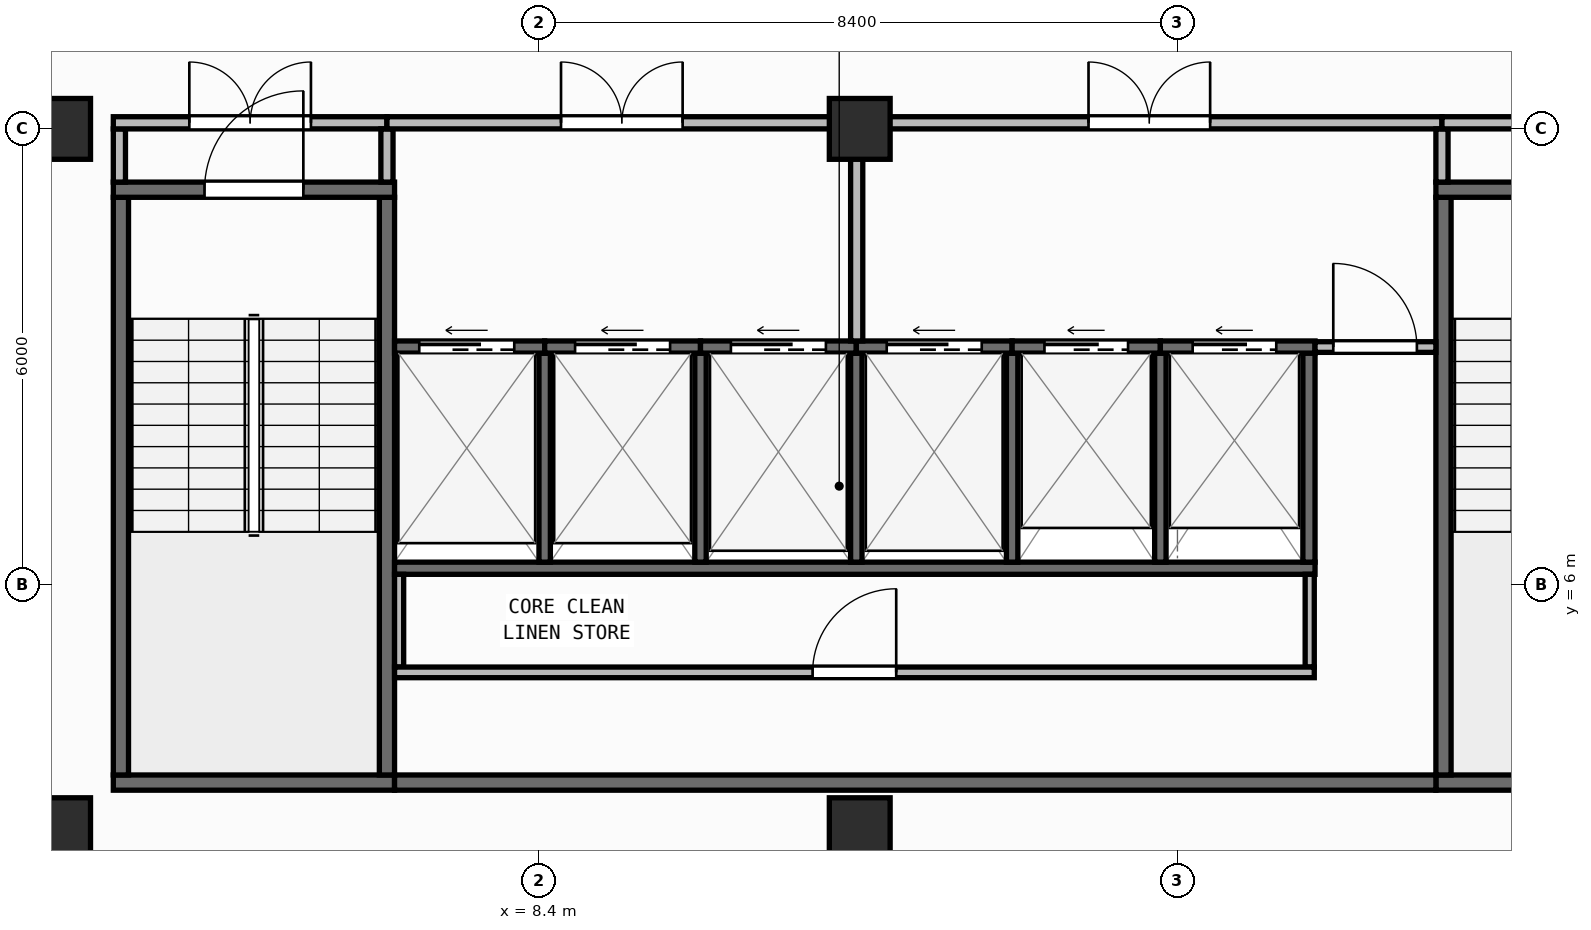
"""IFC4 building model, lengths in metres.
Left out: names, types, materials, properties, quantities, classifications, styles, units other than length and angle.
Written with IfcOpenShell. Run it as: python <this file> out.ifc"""

import sys

from ifc_helpers import new_model, si_unit, direction, frame, frame_2d, origin, origin_2d, place, context, subcontext, project, spatial, rectangle, extrude, element, fill, save


model = new_model("IFC4")
c1 = context("Model", 3, precision=1e-05, world=origin(), true_north=direction((0.0, 1.0)))
c2 = subcontext(c1, "Body", "Model", "MODEL_VIEW")
j1 = project(units=[si_unit("LENGTHUNIT", "METRE"), si_unit("PLANEANGLEUNIT", "RADIAN")], contexts=[c1])
p1 = place(None, origin())
s1 = spatial("IfcSite", under=j1, at=p1, CompositionType="ELEMENT")
p2 = place(p1, origin())
s2 = spatial("IfcBuilding", under=s1, at=p2, CompositionType="ELEMENT")
p3 = place(p2, frame((0.0, 0.0, 288.15)))
s3 = spatial("IfcBuildingStorey", under=s2, at=p3, CompositionType="ELEMENT", Elevation=288.15)
for number, where, z_axis, x_axis in (
    (1, (2.1, 2.8, 0.0), (0.0, 0.0, 1.0), (1.0, 0.0, 0.0)),
    (2, (12.62, 2.8, 0.0), (0.0, 0.0, 1.0), (1.0, 0.0, 0.0)),
    (3, (2.1, 12.0, 0.0), (0.0, 0.0, 1.0), (1.0, 0.0, 0.0)),
    (4, (12.62, 12.0, 0.0), (0.0, 0.0, 1.0), (1.0, 0.0, 0.0)),
):
    element("IfcColumn", number, at=place(p3, frame(where, z_axis=z_axis, x_axis=x_axis)), inside=s3, PredefinedType="COLUMN", context=c2, shape_type="SweptSolid", body=[
        extrude(rectangle(XDim=0.8, YDim=0.8, at=origin_2d()), origin(), (0.0, 0.0, 1.0), 3.95),
    ])
p4 = place(p3, frame((2.46, 0.171, 0.0), z_axis=(0.0, 0.0, 1.0), x_axis=(0.997760665813, 0.066885377746, 0.0)))
e5 = element("IfcWall", 5, at=p4, inside=s3, PredefinedType="STANDARD", context=c2, shape_type="SweptSolid", body=[
    extrude(rectangle(XDim=35.56, YDim=0.26, at=frame_2d((17.78, 0.0))), origin(), (0.0, 0.0, 1.0), 3.71),
])
p5 = place(p4, frame((16.58, 0.0, 0.9)))
e6 = element("IfcOpeningElement", 6, at=p5, cuts=e5, PredefinedType="OPENING", context=c2, shape_type="SweptSolid", body=[
    extrude(rectangle(XDim=2.4, YDim=1.65, at=frame_2d((1.2, 0.825))), frame((0.0, 0.14, 0.0), z_axis=(0.0, -1.0, 0.0), x_axis=(1.0, 0.0, 0.0)), (0.0, 0.0, 1.0), 0.28),
])
p6 = place(p3, frame((2.8, 3.4, 0.0), z_axis=(0.0, 0.0, 1.0), x_axis=(1.0, 0.0, 0.0)))
e7 = element("IfcWall", 7, at=p6, inside=s3, PredefinedType="SHEAR", context=c2, shape_type="SweptSolid", body=[
    extrude(rectangle(XDim=3.7, YDim=0.2, at=frame_2d((1.85, 0.0))), origin(), (0.0, 0.0, 1.0), 3.71),
])
for number, where, z_axis, x_axis in (
    (8, (2.9, 3.5, 0.0), (0.0, 0.0, 1.0), (0.0, 1.0, 0.0)),
    (9, (6.4, 3.5, 0.0), (0.0, 0.0, 1.0), (0.0, 1.0, 0.0)),
):
    element("IfcWall", number, at=place(p3, frame(where, z_axis=z_axis, x_axis=x_axis)), inside=s3, PredefinedType="SHEAR", context=c2, shape_type="SweptSolid", body=[
        extrude(rectangle(XDim=7.6, YDim=0.2, at=frame_2d((3.8, 0.0))), origin(), (0.0, 0.0, 1.0), 3.71),
    ])
p7 = place(p3, frame((2.8, 11.2, 0.0), z_axis=(0.0, 0.0, 1.0), x_axis=(1.0, 0.0, 0.0)))
e10 = element("IfcWall", 10, at=p7, inside=s3, PredefinedType="SHEAR", context=c2, shape_type="SweptSolid", body=[
    extrude(rectangle(XDim=3.7, YDim=0.2, at=frame_2d((1.85, 0.0))), origin(), (0.0, 0.0, 1.0), 3.71),
])
p8 = place(p7, frame((1.2, 0.0, 0.0)))
e11 = element("IfcOpeningElement", 11, at=p8, cuts=e10, PredefinedType="OPENING", context=c2, shape_type="SweptSolid", body=[
    extrude(rectangle(XDim=1.3, YDim=2.15, at=frame_2d((0.65, 1.075))), frame((0.0, 0.11, 0.0), z_axis=(0.0, -1.0, 0.0), x_axis=(1.0, 0.0, 0.0)), (0.0, 0.0, 1.0), 0.22),
])
p9 = place(p3, frame((20.2, 3.4, 0.0), z_axis=(0.0, 0.0, 1.0), x_axis=(1.0, 0.0, 0.0)))
e12 = element("IfcWall", 12, at=p9, inside=s3, PredefinedType="SHEAR", context=c2, shape_type="SweptSolid", body=[
    extrude(rectangle(XDim=3.7, YDim=0.2, at=frame_2d((1.85, 0.0))), origin(), (0.0, 0.0, 1.0), 3.71),
])
p10 = place(p3, frame((20.3, 3.5, 0.0), z_axis=(0.0, 0.0, 1.0), x_axis=(0.0, 1.0, 0.0)))
e13 = element("IfcWall", 13, at=p10, inside=s3, PredefinedType="SHEAR", context=c2, shape_type="SweptSolid", body=[
    extrude(rectangle(XDim=7.6, YDim=0.2, at=frame_2d((3.8, 0.0))), origin(), (0.0, 0.0, 1.0), 3.71),
])
p11 = place(p3, frame((20.2, 11.2, 0.0), z_axis=(0.0, 0.0, 1.0), x_axis=(1.0, 0.0, 0.0)))
e14 = element("IfcWall", 14, at=p11, inside=s3, PredefinedType="SHEAR", context=c2, shape_type="SweptSolid", body=[
    extrude(rectangle(XDim=3.7, YDim=0.2, at=frame_2d((1.85, 0.0))), origin(), (0.0, 0.0, 1.0), 3.71),
])
p12 = place(p11, frame((1.2, 0.0, 0.0)))
e15 = element("IfcOpeningElement", 15, at=p12, cuts=e14, PredefinedType="OPENING", context=c2, shape_type="SweptSolid", body=[
    extrude(rectangle(XDim=1.3, YDim=2.15, at=frame_2d((0.65, 1.075))), frame((0.0, 0.11, 0.0), z_axis=(0.0, -1.0, 0.0), x_axis=(1.0, 0.0, 0.0)), (0.0, 0.0, 1.0), 0.22),
])
p13 = place(p3, frame((6.5, 3.4, 0.0), z_axis=(0.0, 0.0, 1.0), x_axis=(1.0, 0.0, 0.0)))
e16 = element("IfcWall", 16, at=p13, inside=s3, PredefinedType="SHEAR", context=c2, shape_type="SweptSolid", body=[
    extrude(rectangle(XDim=13.7, YDim=0.2, at=frame_2d((6.85, 0.0))), origin(), (0.0, 0.0, 1.0), 3.71),
])
p14 = place(p3, frame((6.5, 6.22, 0.0), z_axis=(0.0, 0.0, 1.0), x_axis=(1.0, 0.0, 0.0)))
e17 = element("IfcWall", 17, at=p14, inside=s3, PredefinedType="SHEAR", context=c2, shape_type="SweptSolid", body=[
    extrude(rectangle(XDim=12.11, YDim=0.16, at=frame_2d((6.055, 0.0))), origin(), (0.0, 0.0, 1.0), 3.71),
])
p15 = place(p3, frame((18.53, 6.3, 0.0), z_axis=(0.0, 0.0, 1.0), x_axis=(0.0, 1.0, 0.0)))
e18 = element("IfcWall", 18, at=p15, inside=s3, PredefinedType="SHEAR", context=c2, shape_type="SweptSolid", body=[
    extrude(rectangle(XDim=2.75, YDim=0.16, at=frame_2d((1.375, 0.0))), origin(), (0.0, 0.0, 1.0), 3.71),
])
for number, where, z_axis, x_axis in (
    (19, (8.475, 6.3, 0.0), (0.0, 0.0, 1.0), (0.0, 1.0, 0.0)),
    (20, (10.525, 6.3, 0.0), (0.0, 0.0, 1.0), (0.0, 1.0, 0.0)),
    (21, (12.575, 6.3, 0.0), (0.0, 0.0, 1.0), (0.0, 1.0, 0.0)),
    (22, (14.625, 6.3, 0.0), (0.0, 0.0, 1.0), (0.0, 1.0, 0.0)),
    (23, (16.575, 6.3, 0.0), (0.0, 0.0, 1.0), (0.0, 1.0, 0.0)),
):
    element("IfcWall", number, at=place(p3, frame(where, z_axis=z_axis, x_axis=x_axis)), inside=s3, PredefinedType="SHEAR", context=c2, shape_type="SweptSolid", body=[
        extrude(rectangle(XDim=2.75, YDim=0.15, at=frame_2d((1.375, 0.0))), origin(), (0.0, 0.0, 1.0), 3.71),
    ])
p16 = place(p3, frame((6.5, 9.13, 0.0), z_axis=(0.0, 0.0, 1.0), x_axis=(1.0, 0.0, 0.0)))
e24 = element("IfcWall", 24, at=p16, inside=s3, PredefinedType="SHEAR", context=c2, shape_type="SweptSolid", body=[
    extrude(rectangle(XDim=1.975, YDim=0.16, at=frame_2d((0.988, 0.0))), origin(), (0.0, 0.0, 1.0), 3.71),
])
p17 = place(p16, frame((0.325, 0.0, 0.0)))
e25 = element("IfcOpeningElement", 25, at=p17, cuts=e24, PredefinedType="OPENING", context=c2, shape_type="SweptSolid", body=[
    extrude(rectangle(XDim=1.25, YDim=2.15, at=frame_2d((0.625, 1.075))), frame((0.0, 0.09, 0.0), z_axis=(0.0, -1.0, 0.0), x_axis=(1.0, 0.0, 0.0)), (0.0, 0.0, 1.0), 0.18),
])
p18 = place(p3, frame((8.475, 9.13, 0.0), z_axis=(0.0, 0.0, 1.0), x_axis=(1.0, 0.0, 0.0)))
e26 = element("IfcWall", 26, at=p18, inside=s3, PredefinedType="SHEAR", context=c2, shape_type="SweptSolid", body=[
    extrude(rectangle(XDim=2.05, YDim=0.16, at=frame_2d((1.025, 0.0))), origin(), (0.0, 0.0, 1.0), 3.71),
])
p19 = place(p18, frame((0.4, 0.0, 0.0)))
e27 = element("IfcOpeningElement", 27, at=p19, cuts=e26, PredefinedType="OPENING", context=c2, shape_type="SweptSolid", body=[
    extrude(rectangle(XDim=1.25, YDim=2.15, at=frame_2d((0.625, 1.075))), frame((0.0, 0.09, 0.0), z_axis=(0.0, -1.0, 0.0), x_axis=(1.0, 0.0, 0.0)), (0.0, 0.0, 1.0), 0.18),
])
p20 = place(p3, frame((10.525, 9.13, 0.0), z_axis=(0.0, 0.0, 1.0), x_axis=(1.0, 0.0, 0.0)))
e28 = element("IfcWall", 28, at=p20, inside=s3, PredefinedType="SHEAR", context=c2, shape_type="SweptSolid", body=[
    extrude(rectangle(XDim=2.05, YDim=0.16, at=frame_2d((1.025, 0.0))), origin(), (0.0, 0.0, 1.0), 3.71),
])
p21 = place(p20, frame((0.4, 0.0, 0.0)))
e29 = element("IfcOpeningElement", 29, at=p21, cuts=e28, PredefinedType="OPENING", context=c2, shape_type="SweptSolid", body=[
    extrude(rectangle(XDim=1.25, YDim=2.15, at=frame_2d((0.625, 1.075))), frame((0.0, 0.09, 0.0), z_axis=(0.0, -1.0, 0.0), x_axis=(1.0, 0.0, 0.0)), (0.0, 0.0, 1.0), 0.18),
])
p22 = place(p3, frame((12.575, 9.13, 0.0), z_axis=(0.0, 0.0, 1.0), x_axis=(1.0, 0.0, 0.0)))
e30 = element("IfcWall", 30, at=p22, inside=s3, PredefinedType="SHEAR", context=c2, shape_type="SweptSolid", body=[
    extrude(rectangle(XDim=2.05, YDim=0.16, at=frame_2d((1.025, 0.0))), origin(), (0.0, 0.0, 1.0), 3.71),
])
p23 = place(p22, frame((0.4, 0.0, 0.0)))
e31 = element("IfcOpeningElement", 31, at=p23, cuts=e30, PredefinedType="OPENING", context=c2, shape_type="SweptSolid", body=[
    extrude(rectangle(XDim=1.25, YDim=2.15, at=frame_2d((0.625, 1.075))), frame((0.0, 0.09, 0.0), z_axis=(0.0, -1.0, 0.0), x_axis=(1.0, 0.0, 0.0)), (0.0, 0.0, 1.0), 0.18),
])
p24 = place(p3, frame((14.625, 9.13, 0.0), z_axis=(0.0, 0.0, 1.0), x_axis=(1.0, 0.0, 0.0)))
e32 = element("IfcWall", 32, at=p24, inside=s3, PredefinedType="SHEAR", context=c2, shape_type="SweptSolid", body=[
    extrude(rectangle(XDim=1.95, YDim=0.16, at=frame_2d((0.975, 0.0))), origin(), (0.0, 0.0, 1.0), 3.71),
])
p25 = place(p24, frame((0.425, 0.0, 0.0)))
e33 = element("IfcOpeningElement", 33, at=p25, cuts=e32, PredefinedType="OPENING", context=c2, shape_type="SweptSolid", body=[
    extrude(rectangle(XDim=1.1, YDim=2.15, at=frame_2d((0.55, 1.075))), frame((0.0, 0.09, 0.0), z_axis=(0.0, -1.0, 0.0), x_axis=(1.0, 0.0, 0.0)), (0.0, 0.0, 1.0), 0.18),
])
p26 = place(p3, frame((16.575, 9.13, 0.0), z_axis=(0.0, 0.0, 1.0), x_axis=(1.0, 0.0, 0.0)))
e34 = element("IfcWall", 34, at=p26, inside=s3, PredefinedType="SHEAR", context=c2, shape_type="SweptSolid", body=[
    extrude(rectangle(XDim=2.035, YDim=0.16, at=frame_2d((1.018, 0.0))), origin(), (0.0, 0.0, 1.0), 3.71),
])
p27 = place(p26, frame((0.425, 0.0, 0.0)))
e35 = element("IfcOpeningElement", 35, at=p27, cuts=e34, PredefinedType="OPENING", context=c2, shape_type="SweptSolid", body=[
    extrude(rectangle(XDim=1.1, YDim=2.15, at=frame_2d((0.55, 1.075))), frame((0.0, 0.09, 0.0), z_axis=(0.0, -1.0, 0.0), x_axis=(1.0, 0.0, 0.0)), (0.0, 0.0, 1.0), 0.18),
])
for number, where, z_axis, x_axis in (
    (36, (6.56, 4.92, 0.0), (0.0, 0.0, 1.0), (0.0, 1.0, 0.0)),
    (37, (18.54, 4.92, 0.0), (0.0, 0.0, 1.0), (0.0, 1.0, 0.0)),
):
    element("IfcWall", number, at=place(p3, frame(where, z_axis=z_axis, x_axis=x_axis)), inside=s3, PredefinedType="PARTITIONING", context=c2, shape_type="SweptSolid", body=[
        extrude(rectangle(XDim=1.22, YDim=0.12, at=frame_2d((0.61, 0.0))), origin(), (0.0, 0.0, 1.0), 3.71),
    ])
p28 = place(p3, frame((6.5, 4.85, 0.0), z_axis=(0.0, 0.0, 1.0), x_axis=(1.0, 0.0, 0.0)))
e38 = element("IfcWall", 38, at=p28, inside=s3, PredefinedType="PARTITIONING", context=c2, shape_type="SweptSolid", body=[
    extrude(rectangle(XDim=12.1, YDim=0.14, at=frame_2d((6.05, 0.0))), origin(), (0.0, 0.0, 1.0), 3.71),
])
p29 = place(p28, frame((5.5, 0.0, 0.0)))
e39 = element("IfcOpeningElement", 39, at=p29, cuts=e38, PredefinedType="OPENING", context=c2, shape_type="SweptSolid", body=[
    extrude(rectangle(XDim=1.1, YDim=2.1, at=frame_2d((0.55, 1.05))), frame((0.0, 0.08, 0.0), z_axis=(0.0, -1.0, 0.0), x_axis=(1.0, 0.0, 0.0)), (0.0, 0.0, 1.0), 0.16),
])
p30 = place(p3, frame((18.61, 9.13, 0.0), z_axis=(0.0, 0.0, 1.0), x_axis=(1.0, 0.0, 0.0)))
e40 = element("IfcWall", 40, at=p30, inside=s3, PredefinedType="PARTITIONING", context=c2, shape_type="SweptSolid", body=[
    extrude(rectangle(XDim=1.59, YDim=0.14, at=frame_2d((0.795, 0.0))), origin(), (0.0, 0.0, 1.0), 3.71),
])
p31 = place(p30, frame((0.24, 0.0, 0.0)))
e41 = element("IfcOpeningElement", 41, at=p31, cuts=e40, PredefinedType="OPENING", context=c2, shape_type="SweptSolid", body=[
    extrude(rectangle(XDim=1.1, YDim=2.1, at=frame_2d((0.55, 1.05))), frame((0.0, 0.08, 0.0), z_axis=(0.0, -1.0, 0.0), x_axis=(1.0, 0.0, 0.0)), (0.0, 0.0, 1.0), 0.16),
])
p32 = place(p3, frame((2.88, 11.3, 0.0), z_axis=(0.0, 0.0, 1.0), x_axis=(0.0, 1.0, 0.0)))
e42 = element("IfcWall", 42, at=p32, inside=s3, PredefinedType="PARTITIONING", context=c2, shape_type="SweptSolid", body=[
    extrude(rectangle(XDim=0.7, YDim=0.16, at=frame_2d((0.35, 0.0))), origin(), (0.0, 0.0, 1.0), 3.71),
])
p33 = place(p3, frame((2.8, 12.08, 0.0), z_axis=(0.0, 0.0, 1.0), x_axis=(1.0, 0.0, 0.0)))
e43 = element("IfcWall", 43, at=p33, inside=s3, PredefinedType="PARTITIONING", context=c2, shape_type="SweptSolid", body=[
    extrude(rectangle(XDim=3.6, YDim=0.16, at=frame_2d((1.8, 0.0))), origin(), (0.0, 0.0, 1.0), 3.157),
])
p34 = place(p33, frame((1.0, 0.0, 0.0)))
e44 = element("IfcOpeningElement", 44, at=p34, cuts=e43, PredefinedType="OPENING", context=c2, shape_type="SweptSolid", body=[
    extrude(rectangle(XDim=1.6, YDim=2.05, at=frame_2d((0.8, 1.025))), frame((0.0, 0.09, 0.0), z_axis=(0.0, -1.0, 0.0), x_axis=(1.0, 0.0, 0.0)), (0.0, 0.0, 1.0), 0.18),
])
p35 = place(p3, frame((6.4, 11.3, 0.0), z_axis=(0.0, 0.0, 1.0), x_axis=(0.0, 1.0, 0.0)))
e45 = element("IfcWall", 45, at=p35, inside=s3, PredefinedType="PARTITIONING", context=c2, shape_type="SweptSolid", body=[
    extrude(rectangle(XDim=0.7, YDim=0.16, at=frame_2d((0.35, 0.0))), origin(), (0.0, 0.0, 1.0), 3.71),
])
p36 = place(p3, frame((6.4, 12.08, 0.0), z_axis=(0.0, 0.0, 1.0), x_axis=(1.0, 0.0, 0.0)))
e46 = element("IfcWall", 46, at=p36, inside=s3, PredefinedType="PARTITIONING", context=c2, shape_type="SweptSolid", body=[
    extrude(rectangle(XDim=6.18, YDim=0.16, at=frame_2d((3.09, 0.0))), origin(), (0.0, 0.0, 1.0), 3.157),
])
p37 = place(p36, frame((2.29, 0.0, 0.0)))
e47 = element("IfcOpeningElement", 47, at=p37, cuts=e46, PredefinedType="OPENING", context=c2, shape_type="SweptSolid", body=[
    extrude(rectangle(XDim=1.6, YDim=2.05, at=frame_2d((0.8, 1.025))), frame((0.0, 0.09, 0.0), z_axis=(0.0, -1.0, 0.0), x_axis=(1.0, 0.0, 0.0)), (0.0, 0.0, 1.0), 0.18),
])
p38 = place(p3, frame((12.58, 9.21, 0.0), z_axis=(0.0, 0.0, 1.0), x_axis=(0.0, 1.0, 0.0)))
e48 = element("IfcWall", 48, at=p38, inside=s3, PredefinedType="PARTITIONING", context=c2, shape_type="SweptSolid", body=[
    extrude(rectangle(XDim=2.79, YDim=0.16, at=frame_2d((1.395, 0.0))), origin(), (0.0, 0.0, 1.0), 3.71),
])
p39 = place(p3, frame((12.58, 12.08, 0.0), z_axis=(0.0, 0.0, 1.0), x_axis=(1.0, 0.0, 0.0)))
e49 = element("IfcWall", 49, at=p39, inside=s3, PredefinedType="PARTITIONING", context=c2, shape_type="SweptSolid", body=[
    extrude(rectangle(XDim=7.7, YDim=0.16, at=frame_2d((3.85, 0.0))), origin(), (0.0, 0.0, 1.0), 3.157),
])
p40 = place(p39, frame((3.05, 0.0, 0.0)))
e50 = element("IfcOpeningElement", 50, at=p40, cuts=e49, PredefinedType="OPENING", context=c2, shape_type="SweptSolid", body=[
    extrude(rectangle(XDim=1.6, YDim=2.05, at=frame_2d((0.8, 1.025))), frame((0.0, 0.09, 0.0), z_axis=(0.0, -1.0, 0.0), x_axis=(1.0, 0.0, 0.0)), (0.0, 0.0, 1.0), 0.18),
])
p41 = place(p3, frame((20.28, 11.3, 0.0), z_axis=(0.0, 0.0, 1.0), x_axis=(0.0, 1.0, 0.0)))
e51 = element("IfcWall", 51, at=p41, inside=s3, PredefinedType="PARTITIONING", context=c2, shape_type="SweptSolid", body=[
    extrude(rectangle(XDim=0.7, YDim=0.16, at=frame_2d((0.35, 0.0))), origin(), (0.0, 0.0, 1.0), 3.71),
])
p42 = place(p3, frame((20.28, 12.08, 0.0), z_axis=(0.0, 0.0, 1.0), x_axis=(1.0, 0.0, 0.0)))
e52 = element("IfcWall", 52, at=p42, inside=s3, PredefinedType="PARTITIONING", context=c2, shape_type="SweptSolid", body=[
    extrude(rectangle(XDim=3.62, YDim=0.16, at=frame_2d((1.81, 0.0))), origin(), (0.0, 0.0, 1.0), 3.157),
])
p43 = place(p42, frame((1.01, 0.0, 0.0)))
e53 = element("IfcOpeningElement", 53, at=p43, cuts=e52, PredefinedType="OPENING", context=c2, shape_type="SweptSolid", body=[
    extrude(rectangle(XDim=1.6, YDim=2.05, at=frame_2d((0.8, 1.025))), frame((0.0, 0.09, 0.0), z_axis=(0.0, -1.0, 0.0), x_axis=(1.0, 0.0, 0.0)), (0.0, 0.0, 1.0), 0.18),
])
p44 = place(p8, origin())
e54 = element("IfcDoor", 54, at=p44, inside=s3, OperationType="SINGLE_SWING_RIGHT", PredefinedType="DOOR", context=c2, shape_type="SweptSolid", body=[
    extrude(rectangle(XDim=1.3, YDim=2.15, at=frame_2d((0.65, 1.075))), frame((0.0, 0.025, 0.0), z_axis=(0.0, -1.0, 0.0), x_axis=(1.0, 0.0, 0.0)), (0.0, 0.0, 1.0), 0.05),
])
fill(e11, e54)
p45 = place(p17, origin())
e55 = element("IfcDoor", 55, at=p45, inside=s3, OperationType="SLIDING_TO_LEFT", PredefinedType="DOOR", context=c2, shape_type="SweptSolid", body=[
    extrude(rectangle(XDim=1.25, YDim=2.15, at=frame_2d((0.625, 1.075))), frame((0.0, 0.025, 0.0), z_axis=(0.0, -1.0, 0.0), x_axis=(1.0, 0.0, 0.0)), (0.0, 0.0, 1.0), 0.05),
])
fill(e25, e55)
p46 = place(p19, origin())
e56 = element("IfcDoor", 56, at=p46, inside=s3, OperationType="SLIDING_TO_LEFT", PredefinedType="DOOR", context=c2, shape_type="SweptSolid", body=[
    extrude(rectangle(XDim=1.25, YDim=2.15, at=frame_2d((0.625, 1.075))), frame((0.0, 0.025, 0.0), z_axis=(0.0, -1.0, 0.0), x_axis=(1.0, 0.0, 0.0)), (0.0, 0.0, 1.0), 0.05),
])
fill(e27, e56)
p47 = place(p21, origin())
e57 = element("IfcDoor", 57, at=p47, inside=s3, OperationType="SLIDING_TO_LEFT", PredefinedType="DOOR", context=c2, shape_type="SweptSolid", body=[
    extrude(rectangle(XDim=1.25, YDim=2.15, at=frame_2d((0.625, 1.075))), frame((0.0, 0.025, 0.0), z_axis=(0.0, -1.0, 0.0), x_axis=(1.0, 0.0, 0.0)), (0.0, 0.0, 1.0), 0.05),
])
fill(e29, e57)
p48 = place(p23, origin())
e58 = element("IfcDoor", 58, at=p48, inside=s3, OperationType="SLIDING_TO_LEFT", PredefinedType="DOOR", context=c2, shape_type="SweptSolid", body=[
    extrude(rectangle(XDim=1.25, YDim=2.15, at=frame_2d((0.625, 1.075))), frame((0.0, 0.025, 0.0), z_axis=(0.0, -1.0, 0.0), x_axis=(1.0, 0.0, 0.0)), (0.0, 0.0, 1.0), 0.05),
])
fill(e31, e58)
p49 = place(p25, origin())
e59 = element("IfcDoor", 59, at=p49, inside=s3, OperationType="SLIDING_TO_LEFT", PredefinedType="DOOR", context=c2, shape_type="SweptSolid", body=[
    extrude(rectangle(XDim=1.1, YDim=2.15, at=frame_2d((0.55, 1.075))), frame((0.0, 0.025, 0.0), z_axis=(0.0, -1.0, 0.0), x_axis=(1.0, 0.0, 0.0)), (0.0, 0.0, 1.0), 0.05),
])
fill(e33, e59)
p50 = place(p27, origin())
e60 = element("IfcDoor", 60, at=p50, inside=s3, OperationType="SLIDING_TO_LEFT", PredefinedType="DOOR", context=c2, shape_type="SweptSolid", body=[
    extrude(rectangle(XDim=1.1, YDim=2.15, at=frame_2d((0.55, 1.075))), frame((0.0, 0.025, 0.0), z_axis=(0.0, -1.0, 0.0), x_axis=(1.0, 0.0, 0.0)), (0.0, 0.0, 1.0), 0.05),
])
fill(e35, e60)
p51 = place(p29, origin())
e61 = element("IfcDoor", 61, at=p51, inside=s3, OperationType="SINGLE_SWING_RIGHT", PredefinedType="DOOR", context=c2, shape_type="SweptSolid", body=[
    extrude(rectangle(XDim=1.1, YDim=2.1, at=frame_2d((0.55, 1.05))), frame((0.0, 0.025, 0.0), z_axis=(0.0, -1.0, 0.0), x_axis=(1.0, 0.0, 0.0)), (0.0, 0.0, 1.0), 0.05),
])
fill(e39, e61)
p52 = place(p31, origin())
e62 = element("IfcDoor", 62, at=p52, inside=s3, OperationType="SINGLE_SWING_LEFT", PredefinedType="DOOR", context=c2, shape_type="SweptSolid", body=[
    extrude(rectangle(XDim=1.1, YDim=2.1, at=frame_2d((0.55, 1.05))), frame((0.0, 0.025, 0.0), z_axis=(0.0, -1.0, 0.0), x_axis=(1.0, 0.0, 0.0)), (0.0, 0.0, 1.0), 0.05),
])
fill(e41, e62)
p53 = place(p34, origin())
e63 = element("IfcDoor", 63, at=p53, inside=s3, OperationType="DOUBLE_DOOR_SINGLE_SWING", PredefinedType="DOOR", context=c2, shape_type="SweptSolid", body=[
    extrude(rectangle(XDim=1.6, YDim=2.05, at=frame_2d((0.8, 1.025))), frame((0.0, 0.025, 0.0), z_axis=(0.0, -1.0, 0.0), x_axis=(1.0, 0.0, 0.0)), (0.0, 0.0, 1.0), 0.05),
])
fill(e44, e63)
p54 = place(p37, origin())
e64 = element("IfcDoor", 64, at=p54, inside=s3, OperationType="DOUBLE_DOOR_SINGLE_SWING", PredefinedType="DOOR", context=c2, shape_type="SweptSolid", body=[
    extrude(rectangle(XDim=1.6, YDim=2.05, at=frame_2d((0.8, 1.025))), frame((0.0, 0.025, 0.0), z_axis=(0.0, -1.0, 0.0), x_axis=(1.0, 0.0, 0.0)), (0.0, 0.0, 1.0), 0.05),
])
fill(e47, e64)
p55 = place(p40, origin())
e65 = element("IfcDoor", 65, at=p55, inside=s3, OperationType="DOUBLE_DOOR_SINGLE_SWING", PredefinedType="DOOR", context=c2, shape_type="SweptSolid", body=[
    extrude(rectangle(XDim=1.6, YDim=2.05, at=frame_2d((0.8, 1.025))), frame((0.0, 0.025, 0.0), z_axis=(0.0, -1.0, 0.0), x_axis=(1.0, 0.0, 0.0)), (0.0, 0.0, 1.0), 0.05),
])
fill(e50, e65)
save(model, sys.argv[1])
